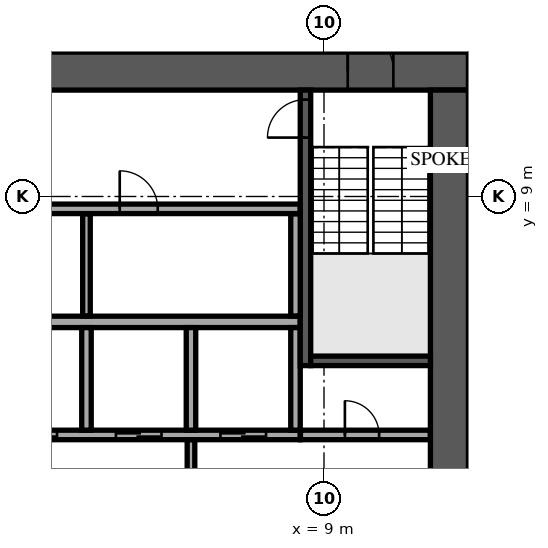
"""IFC4 building model, lengths in metres.
Left out: names, types, materials, properties, quantities, classifications, styles, units other than length and angle.
Written with IfcOpenShell. Run it as: python <this file> out.ifc"""

import sys

from ifc_helpers import new_model, si_unit, direction, frame, frame_2d, origin, place, context, subcontext, project, spatial, rectangle, extrude, element, fill, save


model = new_model("IFC4")
c1 = context("Model", 3, precision=1e-05, world=origin(), true_north=direction((0.0, 1.0)))
c2 = subcontext(c1, "Body", "Model", "MODEL_VIEW")
j1 = project(units=[si_unit("LENGTHUNIT", "METRE"), si_unit("PLANEANGLEUNIT", "RADIAN")], contexts=[c1])
p1 = place(None, origin())
s1 = spatial("IfcSite", under=j1, at=p1, CompositionType="ELEMENT")
p2 = place(p1, origin())
s2 = spatial("IfcBuilding", under=s1, at=p2, CompositionType="ELEMENT")
p3 = place(p2, frame((0.0, 0.0, 163.7)))
s3 = spatial("IfcBuildingStorey", under=s2, at=p3, CompositionType="ELEMENT", Elevation=163.7)
p4 = place(p3, frame((-12.8, 12.3, 0.0), z_axis=(0.0, 0.0, 1.0), x_axis=(1.0, 0.0, 0.0)))
e1 = element("IfcWall", 1, at=p4, inside=s3, PredefinedType="SHEAR", context=c2, shape_type="SweptSolid", body=[
    extrude(rectangle(XDim=25.6, YDim=1.0, at=frame_2d((12.8, 0.0))), origin(), (0.0, 0.0, 1.0), 3.6),
])
p5 = place(p4, frame((11.6, 0.0, 0.0)))
e2 = element("IfcOpeningElement", 2, at=p5, cuts=e1, PredefinedType="OPENING", context=c2, shape_type="SweptSolid", body=[
    extrude(rectangle(XDim=2.4, YDim=2.4, at=frame_2d((1.2, 1.2))), frame((0.0, 0.51, 0.0), z_axis=(0.0, -1.0, 0.0), x_axis=(1.0, 0.0, 0.0)), (0.0, 0.0, 1.0), 1.02),
])
p6 = place(p4, frame((22.425, 0.0, 0.0)))
e3 = element("IfcOpeningElement", 3, at=p6, cuts=e1, PredefinedType="OPENING", context=c2, shape_type="SweptSolid", body=[
    extrude(rectangle(XDim=1.2, YDim=2.1, at=frame_2d((0.6, 1.05))), frame((0.0, 0.51, 0.0), z_axis=(0.0, -1.0, 0.0), x_axis=(1.0, 0.0, 0.0)), (0.0, 0.0, 1.0), 1.02),
])
p7 = place(p4, frame((1.4, 0.0, 0.0)))
e4 = element("IfcOpeningElement", 4, at=p7, cuts=e1, PredefinedType="OPENING", context=c2, shape_type="SweptSolid", body=[
    extrude(rectangle(XDim=1.0, YDim=2.1, at=frame_2d((0.5, 1.05))), frame((0.0, 0.51, 0.0), z_axis=(0.0, -1.0, 0.0), x_axis=(1.0, 0.0, 0.0)), (0.0, 0.0, 1.0), 1.02),
])
p8 = place(p3, frame((12.3, -11.8, 0.0), z_axis=(0.0, 0.0, 1.0), x_axis=(0.0, 1.0, 0.0)))
e5 = element("IfcWall", 5, at=p8, inside=s3, PredefinedType="SHEAR", context=c2, shape_type="SweptSolid", body=[
    extrude(rectangle(XDim=23.6, YDim=1.0, at=frame_2d((11.8, 0.0))), origin(), (0.0, 0.0, 1.0), 3.6),
])
p9 = place(p8, frame((10.6, 0.0, 0.0)))
e6 = element("IfcOpeningElement", 6, at=p9, cuts=e5, PredefinedType="OPENING", context=c2, shape_type="SweptSolid", body=[
    extrude(rectangle(XDim=2.4, YDim=2.4, at=frame_2d((1.2, 1.2))), frame((0.0, 0.51, 0.0), z_axis=(0.0, -1.0, 0.0), x_axis=(1.0, 0.0, 0.0)), (0.0, 0.0, 1.0), 1.02),
])
p10 = place(p3, frame((-8.375, 5.7, 0.0), z_axis=(0.0, 0.0, 1.0), x_axis=(1.0, 0.0, 0.0)))
e7 = element("IfcWall", 7, at=p10, inside=s3, PredefinedType="SOLIDWALL", context=c2, shape_type="SweptSolid", body=[
    extrude(rectangle(XDim=16.75, YDim=0.3, at=frame_2d((8.375, 0.0))), origin(), (0.0, 0.0, 1.0), 3.6),
])
p11 = place(p3, frame((-8.375, 2.725, 0.0), z_axis=(0.0, 0.0, 1.0), x_axis=(1.0, 0.0, 0.0)))
e8 = element("IfcWall", 8, at=p11, inside=s3, PredefinedType="SOLIDWALL", context=c2, shape_type="SweptSolid", body=[
    extrude(rectangle(XDim=16.75, YDim=0.25, at=frame_2d((8.375, 0.0))), origin(), (0.0, 0.0, 1.0), 3.6),
])
p12 = place(p11, frame((0.9, 0.0, 0.0)))
e9 = element("IfcOpeningElement", 9, at=p12, cuts=e8, PredefinedType="OPENING", context=c2, shape_type="SweptSolid", body=[
    extrude(rectangle(XDim=1.2, YDim=2.1, at=frame_2d((0.6, 1.05))), frame((0.0, 0.135, 0.0), z_axis=(0.0, -1.0, 0.0), x_axis=(1.0, 0.0, 0.0)), (0.0, 0.0, 1.0), 0.27),
])
p13 = place(p11, frame((3.65, 0.0, 0.0)))
e10 = element("IfcOpeningElement", 10, at=p13, cuts=e8, PredefinedType="OPENING", context=c2, shape_type="SweptSolid", body=[
    extrude(rectangle(XDim=1.2, YDim=2.1, at=frame_2d((0.6, 1.05))), frame((0.0, 0.135, 0.0), z_axis=(0.0, -1.0, 0.0), x_axis=(1.0, 0.0, 0.0)), (0.0, 0.0, 1.0), 0.27),
])
p14 = place(p11, frame((6.4, 0.0, 0.0)))
e11 = element("IfcOpeningElement", 11, at=p14, cuts=e8, PredefinedType="OPENING", context=c2, shape_type="SweptSolid", body=[
    extrude(rectangle(XDim=1.2, YDim=2.1, at=frame_2d((0.6, 1.05))), frame((0.0, 0.135, 0.0), z_axis=(0.0, -1.0, 0.0), x_axis=(1.0, 0.0, 0.0)), (0.0, 0.0, 1.0), 0.27),
])
p15 = place(p11, frame((9.15, 0.0, 0.0)))
e12 = element("IfcOpeningElement", 12, at=p15, cuts=e8, PredefinedType="OPENING", context=c2, shape_type="SweptSolid", body=[
    extrude(rectangle(XDim=1.2, YDim=2.1, at=frame_2d((0.6, 1.05))), frame((0.0, 0.135, 0.0), z_axis=(0.0, -1.0, 0.0), x_axis=(1.0, 0.0, 0.0)), (0.0, 0.0, 1.0), 0.27),
])
p16 = place(p11, frame((11.9, 0.0, 0.0)))
e13 = element("IfcOpeningElement", 13, at=p16, cuts=e8, PredefinedType="OPENING", context=c2, shape_type="SweptSolid", body=[
    extrude(rectangle(XDim=1.2, YDim=2.1, at=frame_2d((0.6, 1.05))), frame((0.0, 0.135, 0.0), z_axis=(0.0, -1.0, 0.0), x_axis=(1.0, 0.0, 0.0)), (0.0, 0.0, 1.0), 0.27),
])
p17 = place(p11, frame((14.65, 0.0, 0.0)))
e14 = element("IfcOpeningElement", 14, at=p17, cuts=e8, PredefinedType="OPENING", context=c2, shape_type="SweptSolid", body=[
    extrude(rectangle(XDim=1.2, YDim=2.1, at=frame_2d((0.6, 1.05))), frame((0.0, 0.135, 0.0), z_axis=(0.0, -1.0, 0.0), x_axis=(1.0, 0.0, 0.0)), (0.0, 0.0, 1.0), 0.27),
])
for number, where, z_axis, x_axis in (
    (15, (2.75, 2.85, 0.0), (0.0, 0.0, 1.0), (0.0, 1.0, 0.0)),
    (16, (5.5, 2.85, 0.0), (0.0, 0.0, 1.0), (0.0, 1.0, 0.0)),
    (17, (8.25, 2.85, 0.0), (0.0, 0.0, 1.0), (0.0, 1.0, 0.0)),
):
    element("IfcWall", number, at=place(p3, frame(where, z_axis=z_axis, x_axis=x_axis)), inside=s3, PredefinedType="SOLIDWALL", context=c2, shape_type="SweptSolid", body=[
        extrude(rectangle(XDim=2.7, YDim=0.25, at=frame_2d((1.35, 0.0))), origin(), (0.0, 0.0, 1.0), 3.6),
    ])
p18 = place(p3, frame((8.512, 4.55, 0.0), z_axis=(0.0, 0.0, 1.0), x_axis=(0.0, 1.0, 0.0)))
e18 = element("IfcWall", 18, at=p18, inside=s3, PredefinedType="SOLIDWALL", context=c2, shape_type="SweptSolid", body=[
    extrude(rectangle(XDim=7.25, YDim=0.275, at=frame_2d((3.625, 0.0))), origin(), (0.0, 0.0, 1.0), 3.6),
])
p19 = place(p18, frame((6.0, 0.0, 0.0)))
e19 = element("IfcOpeningElement", 19, at=p19, cuts=e18, PredefinedType="OPENING", context=c2, shape_type="SweptSolid", body=[
    extrude(rectangle(XDim=1.0, YDim=2.1, at=frame_2d((0.5, 1.05))), frame((0.0, 0.147, 0.0), z_axis=(0.0, -1.0, 0.0), x_axis=(1.0, 0.0, 0.0)), (0.0, 0.0, 1.0), 0.295),
])
p20 = place(p3, frame((8.65, 4.675, 0.0), z_axis=(0.0, 0.0, 1.0), x_axis=(1.0, 0.0, 0.0)))
e20 = element("IfcWall", 20, at=p20, inside=s3, PredefinedType="SOLIDWALL", context=c2, shape_type="SweptSolid", body=[
    extrude(rectangle(XDim=3.15, YDim=0.25, at=frame_2d((1.575, 0.0))), origin(), (0.0, 0.0, 1.0), 3.6),
])
p21 = place(p3, frame((5.5, -2.595, 0.0), z_axis=(0.0, 0.0, 1.0), x_axis=(0.0, 1.0, 0.0)))
e21 = element("IfcWall", 21, at=p21, inside=s3, PredefinedType="PARTITIONING", context=c2, shape_type="SweptSolid", body=[
    extrude(rectangle(XDim=5.19, YDim=0.2, at=frame_2d((2.595, 0.0))), origin(), (0.0, 0.0, 1.0), 3.6),
])
p22 = place(p21, frame((1.395, 0.0, 0.0)))
e22 = element("IfcOpeningElement", 22, at=p22, cuts=e21, PredefinedType="OPENING", context=c2, shape_type="SweptSolid", body=[
    extrude(rectangle(XDim=2.4, YDim=2.4, at=frame_2d((1.2, 1.2))), frame((0.0, 0.11, 0.0), z_axis=(0.0, -1.0, 0.0), x_axis=(1.0, 0.0, 0.0)), (0.0, 0.0, 1.0), 0.22),
])
p23 = place(p3, frame((8.38, 2.725, 0.0), z_axis=(0.0, 0.0, 1.0), x_axis=(1.0, 0.0, 0.0)))
e23 = element("IfcWall", 23, at=p23, inside=s3, PredefinedType="PARTITIONING", context=c2, shape_type="SweptSolid", body=[
    extrude(rectangle(XDim=3.415, YDim=0.25, at=frame_2d((1.708, 0.0))), origin(), (0.0, 0.0, 1.0), 3.6),
])
p24 = place(p23, frame((1.17, 0.0, 0.0)))
e24 = element("IfcOpeningElement", 24, at=p24, cuts=e23, PredefinedType="OPENING", context=c2, shape_type="SweptSolid", body=[
    extrude(rectangle(XDim=0.9, YDim=2.1, at=frame_2d((0.45, 1.05))), frame((0.0, 0.135, 0.0), z_axis=(0.0, -1.0, 0.0), x_axis=(1.0, 0.0, 0.0)), (0.0, 0.0, 1.0), 0.27),
])
p25 = place(p3, frame((2.75, 5.855, 0.0), z_axis=(0.0, 0.0, 1.0), x_axis=(0.0, 1.0, 0.0)))
e25 = element("IfcWall", 25, at=p25, inside=s3, PredefinedType="PARTITIONING", context=c2, shape_type="SweptSolid", body=[
    extrude(rectangle(XDim=2.69, YDim=0.2, at=frame_2d((1.345, 0.0))), origin(), (0.0, 0.0, 1.0), 3.6),
])
p26 = place(p3, frame((8.25, 5.855, 0.0), z_axis=(0.0, 0.0, 1.0), x_axis=(0.0, 1.0, 0.0)))
e26 = element("IfcWall", 26, at=p26, inside=s3, PredefinedType="PARTITIONING", context=c2, shape_type="SweptSolid", body=[
    extrude(rectangle(XDim=2.69, YDim=0.25, at=frame_2d((1.345, 0.0))), origin(), (0.0, 0.0, 1.0), 3.6),
])
p27 = place(p3, frame((-8.35, 8.675, 0.0), z_axis=(0.0, 0.0, 1.0), x_axis=(1.0, 0.0, 0.0)))
e27 = element("IfcWall", 27, at=p27, inside=s3, PredefinedType="PARTITIONING", context=c2, shape_type="SweptSolid", body=[
    extrude(rectangle(XDim=16.72, YDim=0.25, at=frame_2d((8.36, 0.0))), origin(), (0.0, 0.0, 1.0), 3.6),
])
p28 = place(p27, frame((0.875, 0.0, 0.0)))
e28 = element("IfcOpeningElement", 28, at=p28, cuts=e27, PredefinedType="OPENING", context=c2, shape_type="SweptSolid", body=[
    extrude(rectangle(XDim=1.2, YDim=2.1, at=frame_2d((0.6, 1.05))), frame((0.0, 0.135, 0.0), z_axis=(0.0, -1.0, 0.0), x_axis=(1.0, 0.0, 0.0)), (0.0, 0.0, 1.0), 0.27),
])
p29 = place(p27, frame((11.975, 0.0, 0.0)))
e29 = element("IfcOpeningElement", 29, at=p29, cuts=e27, PredefinedType="OPENING", context=c2, shape_type="SweptSolid", body=[
    extrude(rectangle(XDim=1.0, YDim=2.1, at=frame_2d((0.5, 1.05))), frame((0.0, 0.135, 0.0), z_axis=(0.0, -1.0, 0.0), x_axis=(1.0, 0.0, 0.0)), (0.0, 0.0, 1.0), 0.27),
])
p30 = place(p3, frame((4.48, 35.516, 0.0), z_axis=(0.0, 0.0, 1.0), x_axis=(-0.809018017995, -0.587783843398, 0.0)))
e30 = element("IfcWall", 30, at=p30, inside=s3, PredefinedType="STANDARD", context=c2, shape_type="SweptSolid", body=[
    extrude(rectangle(XDim=49.376, YDim=0.6, at=frame_2d((24.688, 0.0))), origin(), (0.0, 0.0, 1.0), 3.6),
])
p31 = place(p30, frame((1.2, 0.0, 0.9)))
e31 = element("IfcOpeningElement", 31, at=p31, cuts=e30, PredefinedType="OPENING", context=c2, shape_type="SweptSolid", body=[
    extrude(rectangle(XDim=2.1, YDim=2.1, at=frame_2d((1.05, 1.05))), frame((0.0, 0.31, 0.0), z_axis=(0.0, -1.0, 0.0), x_axis=(1.0, 0.0, 0.0)), (0.0, 0.0, 1.0), 0.62),
])
p32 = place(p30, frame((5.7, 0.0, 0.9)))
e32 = element("IfcOpeningElement", 32, at=p32, cuts=e30, PredefinedType="OPENING", context=c2, shape_type="SweptSolid", body=[
    extrude(rectangle(XDim=2.1, YDim=2.1, at=frame_2d((1.05, 1.05))), frame((0.0, 0.31, 0.0), z_axis=(0.0, -1.0, 0.0), x_axis=(1.0, 0.0, 0.0)), (0.0, 0.0, 1.0), 0.62),
])
p33 = place(p30, frame((10.2, 0.0, 0.9)))
e33 = element("IfcOpeningElement", 33, at=p33, cuts=e30, PredefinedType="OPENING", context=c2, shape_type="SweptSolid", body=[
    extrude(rectangle(XDim=2.1, YDim=2.1, at=frame_2d((1.05, 1.05))), frame((0.0, 0.31, 0.0), z_axis=(0.0, -1.0, 0.0), x_axis=(1.0, 0.0, 0.0)), (0.0, 0.0, 1.0), 0.62),
])
p34 = place(p30, frame((14.7, 0.0, 0.9)))
e34 = element("IfcOpeningElement", 34, at=p34, cuts=e30, PredefinedType="OPENING", context=c2, shape_type="SweptSolid", body=[
    extrude(rectangle(XDim=2.1, YDim=2.1, at=frame_2d((1.05, 1.05))), frame((0.0, 0.31, 0.0), z_axis=(0.0, -1.0, 0.0), x_axis=(1.0, 0.0, 0.0)), (0.0, 0.0, 1.0), 0.62),
])
p35 = place(p30, frame((19.2, 0.0, 0.9)))
e35 = element("IfcOpeningElement", 35, at=p35, cuts=e30, PredefinedType="OPENING", context=c2, shape_type="SweptSolid", body=[
    extrude(rectangle(XDim=2.1, YDim=2.1, at=frame_2d((1.05, 1.05))), frame((0.0, 0.31, 0.0), z_axis=(0.0, -1.0, 0.0), x_axis=(1.0, 0.0, 0.0)), (0.0, 0.0, 1.0), 0.62),
])
p36 = place(p30, frame((23.7, 0.0, 0.9)))
e36 = element("IfcOpeningElement", 36, at=p36, cuts=e30, PredefinedType="OPENING", context=c2, shape_type="SweptSolid", body=[
    extrude(rectangle(XDim=2.1, YDim=2.1, at=frame_2d((1.05, 1.05))), frame((0.0, 0.31, 0.0), z_axis=(0.0, -1.0, 0.0), x_axis=(1.0, 0.0, 0.0)), (0.0, 0.0, 1.0), 0.62),
])
p37 = place(p30, frame((28.2, 0.0, 0.9)))
e37 = element("IfcOpeningElement", 37, at=p37, cuts=e30, PredefinedType="OPENING", context=c2, shape_type="SweptSolid", body=[
    extrude(rectangle(XDim=2.1, YDim=2.1, at=frame_2d((1.05, 1.05))), frame((0.0, 0.31, 0.0), z_axis=(0.0, -1.0, 0.0), x_axis=(1.0, 0.0, 0.0)), (0.0, 0.0, 1.0), 0.62),
])
p38 = place(p30, frame((32.7, 0.0, 0.9)))
e38 = element("IfcOpeningElement", 38, at=p38, cuts=e30, PredefinedType="OPENING", context=c2, shape_type="SweptSolid", body=[
    extrude(rectangle(XDim=2.1, YDim=2.1, at=frame_2d((1.05, 1.05))), frame((0.0, 0.31, 0.0), z_axis=(0.0, -1.0, 0.0), x_axis=(1.0, 0.0, 0.0)), (0.0, 0.0, 1.0), 0.62),
])
p39 = place(p30, frame((37.2, 0.0, 0.9)))
e39 = element("IfcOpeningElement", 39, at=p39, cuts=e30, PredefinedType="OPENING", context=c2, shape_type="SweptSolid", body=[
    extrude(rectangle(XDim=2.1, YDim=2.1, at=frame_2d((1.05, 1.05))), frame((0.0, 0.31, 0.0), z_axis=(0.0, -1.0, 0.0), x_axis=(1.0, 0.0, 0.0)), (0.0, 0.0, 1.0), 0.62),
])
p40 = place(p30, frame((41.7, 0.0, 0.9)))
e40 = element("IfcOpeningElement", 40, at=p40, cuts=e30, PredefinedType="OPENING", context=c2, shape_type="SweptSolid", body=[
    extrude(rectangle(XDim=2.1, YDim=2.1, at=frame_2d((1.05, 1.05))), frame((0.0, 0.31, 0.0), z_axis=(0.0, -1.0, 0.0), x_axis=(1.0, 0.0, 0.0)), (0.0, 0.0, 1.0), 0.62),
])
p41 = place(p30, frame((46.138, 0.0, 0.9)))
e41 = element("IfcOpeningElement", 41, at=p41, cuts=e30, PredefinedType="OPENING", context=c2, shape_type="SweptSolid", body=[
    extrude(rectangle(XDim=2.1, YDim=2.1, at=frame_2d((1.05, 1.05))), frame((0.0, 0.31, 0.0), z_axis=(0.0, -1.0, 0.0), x_axis=(1.0, 0.0, 0.0)), (0.0, 0.0, 1.0), 0.62),
])
p42 = place(p3, frame((36.533, 0.245, 0.0), z_axis=(0.0, 0.0, 1.0), x_axis=(-0.58778579343, 0.809016601215, 0.0)))
e42 = element("IfcWall", 42, at=p42, inside=s3, PredefinedType="STANDARD", context=c2, shape_type="SweptSolid", body=[
    extrude(rectangle(XDim=42.176, YDim=0.6, at=frame_2d((21.088, 0.0))), origin(), (0.0, 0.0, 1.0), 3.6),
])
p43 = place(p42, frame((1.138, 0.0, 0.9)))
e43 = element("IfcOpeningElement", 43, at=p43, cuts=e42, PredefinedType="OPENING", context=c2, shape_type="SweptSolid", body=[
    extrude(rectangle(XDim=2.3, YDim=2.1, at=frame_2d((1.15, 1.05))), frame((0.0, 0.31, 0.0), z_axis=(0.0, -1.0, 0.0), x_axis=(1.0, 0.0, 0.0)), (0.0, 0.0, 1.0), 0.62),
])
p44 = place(p42, frame((5.776, 0.0, 0.9)))
e44 = element("IfcOpeningElement", 44, at=p44, cuts=e42, PredefinedType="OPENING", context=c2, shape_type="SweptSolid", body=[
    extrude(rectangle(XDim=2.3, YDim=2.1, at=frame_2d((1.15, 1.05))), frame((0.0, 0.31, 0.0), z_axis=(0.0, -1.0, 0.0), x_axis=(1.0, 0.0, 0.0)), (0.0, 0.0, 1.0), 0.62),
])
p45 = place(p42, frame((10.476, 0.0, 0.9)))
e45 = element("IfcOpeningElement", 45, at=p45, cuts=e42, PredefinedType="OPENING", context=c2, shape_type="SweptSolid", body=[
    extrude(rectangle(XDim=2.3, YDim=2.1, at=frame_2d((1.15, 1.05))), frame((0.0, 0.31, 0.0), z_axis=(0.0, -1.0, 0.0), x_axis=(1.0, 0.0, 0.0)), (0.0, 0.0, 1.0), 0.62),
])
p46 = place(p42, frame((15.176, 0.0, 0.9)))
e46 = element("IfcOpeningElement", 46, at=p46, cuts=e42, PredefinedType="OPENING", context=c2, shape_type="SweptSolid", body=[
    extrude(rectangle(XDim=2.3, YDim=2.1, at=frame_2d((1.15, 1.05))), frame((0.0, 0.31, 0.0), z_axis=(0.0, -1.0, 0.0), x_axis=(1.0, 0.0, 0.0)), (0.0, 0.0, 1.0), 0.62),
])
p47 = place(p42, frame((19.876, 0.0, 0.9)))
e47 = element("IfcOpeningElement", 47, at=p47, cuts=e42, PredefinedType="OPENING", context=c2, shape_type="SweptSolid", body=[
    extrude(rectangle(XDim=2.3, YDim=2.1, at=frame_2d((1.15, 1.05))), frame((0.0, 0.31, 0.0), z_axis=(0.0, -1.0, 0.0), x_axis=(1.0, 0.0, 0.0)), (0.0, 0.0, 1.0), 0.62),
])
p48 = place(p42, frame((24.576, 0.0, 0.9)))
e48 = element("IfcOpeningElement", 48, at=p48, cuts=e42, PredefinedType="OPENING", context=c2, shape_type="SweptSolid", body=[
    extrude(rectangle(XDim=2.3, YDim=2.1, at=frame_2d((1.15, 1.05))), frame((0.0, 0.31, 0.0), z_axis=(0.0, -1.0, 0.0), x_axis=(1.0, 0.0, 0.0)), (0.0, 0.0, 1.0), 0.62),
])
p49 = place(p42, frame((29.276, 0.0, 0.9)))
e49 = element("IfcOpeningElement", 49, at=p49, cuts=e42, PredefinedType="OPENING", context=c2, shape_type="SweptSolid", body=[
    extrude(rectangle(XDim=2.3, YDim=2.1, at=frame_2d((1.15, 1.05))), frame((0.0, 0.31, 0.0), z_axis=(0.0, -1.0, 0.0), x_axis=(1.0, 0.0, 0.0)), (0.0, 0.0, 1.0), 0.62),
])
p50 = place(p42, frame((33.976, 0.0, 0.9)))
e50 = element("IfcOpeningElement", 50, at=p50, cuts=e42, PredefinedType="OPENING", context=c2, shape_type="SweptSolid", body=[
    extrude(rectangle(XDim=2.3, YDim=2.1, at=frame_2d((1.15, 1.05))), frame((0.0, 0.31, 0.0), z_axis=(0.0, -1.0, 0.0), x_axis=(1.0, 0.0, 0.0)), (0.0, 0.0, 1.0), 0.62),
])
p51 = place(p42, frame((38.676, 0.0, 0.9)))
e51 = element("IfcOpeningElement", 51, at=p51, cuts=e42, PredefinedType="OPENING", context=c2, shape_type="SweptSolid", body=[
    extrude(rectangle(XDim=2.3, YDim=2.1, at=frame_2d((1.15, 1.05))), frame((0.0, 0.31, 0.0), z_axis=(0.0, -1.0, 0.0), x_axis=(1.0, 0.0, 0.0)), (0.0, 0.0, 1.0), 0.62),
])
p52 = place(p3, frame((-26.166, 4.749, 0.0), z_axis=(0.0, 0.0, 1.0), x_axis=(0.809023795939, 0.587775890628, 0.0)))
e52 = element("IfcWall", 52, at=p52, inside=s3, PredefinedType="PARTITIONING", context=c2, shape_type="SweptSolid", body=[
    extrude(rectangle(XDim=36.756, YDim=0.15, at=frame_2d((18.378, 0.0))), origin(), (0.0, 0.0, 1.0), 3.15),
])
p53 = place(p52, frame((1.8, 0.0, 0.0)))
e53 = element("IfcOpeningElement", 53, at=p53, cuts=e52, PredefinedType="OPENING", context=c2, shape_type="SweptSolid", body=[
    extrude(rectangle(XDim=1.0, YDim=2.1, at=frame_2d((0.5, 1.05))), frame((0.0, 0.085, 0.0), z_axis=(0.0, -1.0, 0.0), x_axis=(1.0, 0.0, 0.0)), (0.0, 0.0, 1.0), 0.17),
])
p54 = place(p52, frame((7.453, 0.0, 0.0)))
e54 = element("IfcOpeningElement", 54, at=p54, cuts=e52, PredefinedType="OPENING", context=c2, shape_type="SweptSolid", body=[
    extrude(rectangle(XDim=1.0, YDim=2.1, at=frame_2d((0.5, 1.05))), frame((0.0, 0.085, 0.0), z_axis=(0.0, -1.0, 0.0), x_axis=(1.0, 0.0, 0.0)), (0.0, 0.0, 1.0), 0.17),
])
p55 = place(p52, frame((20.671, 0.0, 0.0)))
e55 = element("IfcOpeningElement", 55, at=p55, cuts=e52, PredefinedType="OPENING", context=c2, shape_type="SweptSolid", body=[
    extrude(rectangle(XDim=1.0, YDim=2.1, at=frame_2d((0.5, 1.05))), frame((0.0, 0.085, 0.0), z_axis=(0.0, -1.0, 0.0), x_axis=(1.0, 0.0, 0.0)), (0.0, 0.0, 1.0), 0.17),
])
p56 = place(p52, frame((27.382, 0.0, 0.0)))
e56 = element("IfcOpeningElement", 56, at=p56, cuts=e52, PredefinedType="OPENING", context=c2, shape_type="SweptSolid", body=[
    extrude(rectangle(XDim=1.8, YDim=2.1, at=frame_2d((0.9, 1.05))), frame((0.0, 0.085, 0.0), z_axis=(0.0, -1.0, 0.0), x_axis=(1.0, 0.0, 0.0)), (0.0, 0.0, 1.0), 0.17),
])
p57 = place(p3, frame((9.681, 24.652, 0.0), z_axis=(0.0, 0.0, 1.0), x_axis=(0.58776328895, -0.809032951222, 0.0)))
e57 = element("IfcWall", 57, at=p57, inside=s3, PredefinedType="PARTITIONING", context=c2, shape_type="SweptSolid", body=[
    extrude(rectangle(XDim=28.583, YDim=0.15, at=frame_2d((14.291, 0.0))), origin(), (0.0, 0.0, 1.0), 3.15),
])
p58 = place(p57, frame((12.256, 0.0, 0.0)))
e58 = element("IfcOpeningElement", 58, at=p58, cuts=e57, PredefinedType="OPENING", context=c2, shape_type="SweptSolid", body=[
    extrude(rectangle(XDim=1.0, YDim=2.1, at=frame_2d((0.5, 1.05))), frame((0.0, 0.085, 0.0), z_axis=(0.0, -1.0, 0.0), x_axis=(1.0, 0.0, 0.0)), (0.0, 0.0, 1.0), 0.17),
])
p59 = place(p6, origin())
e59 = element("IfcDoor", 59, at=p59, inside=s3, OperationType="SINGLE_SWING_LEFT", PredefinedType="DOOR", context=c2, shape_type="SweptSolid", body=[
    extrude(rectangle(XDim=1.2, YDim=2.1, at=frame_2d((0.6, 1.05))), frame((0.0, 0.025, 0.0), z_axis=(0.0, -1.0, 0.0), x_axis=(1.0, 0.0, 0.0)), (0.0, 0.0, 1.0), 0.05),
])
fill(e3, e59)
p60 = place(p15, origin())
e60 = element("IfcDoor", 60, at=p60, inside=s3, OperationType="DOUBLE_DOOR_SLIDING", PredefinedType="DOOR", context=c2, shape_type="SweptSolid", body=[
    extrude(rectangle(XDim=1.2, YDim=2.1, at=frame_2d((0.6, 1.05))), frame((0.0, 0.025, 0.0), z_axis=(0.0, -1.0, 0.0), x_axis=(1.0, 0.0, 0.0)), (0.0, 0.0, 1.0), 0.05),
])
fill(e12, e60)
p61 = place(p16, origin())
e61 = element("IfcDoor", 61, at=p61, inside=s3, OperationType="DOUBLE_DOOR_SLIDING", PredefinedType="DOOR", context=c2, shape_type="SweptSolid", body=[
    extrude(rectangle(XDim=1.2, YDim=2.1, at=frame_2d((0.6, 1.05))), frame((0.0, 0.025, 0.0), z_axis=(0.0, -1.0, 0.0), x_axis=(1.0, 0.0, 0.0)), (0.0, 0.0, 1.0), 0.05),
])
fill(e13, e61)
p62 = place(p17, origin())
e62 = element("IfcDoor", 62, at=p62, inside=s3, OperationType="DOUBLE_DOOR_SLIDING", PredefinedType="DOOR", context=c2, shape_type="SweptSolid", body=[
    extrude(rectangle(XDim=1.2, YDim=2.1, at=frame_2d((0.6, 1.05))), frame((0.0, 0.025, 0.0), z_axis=(0.0, -1.0, 0.0), x_axis=(1.0, 0.0, 0.0)), (0.0, 0.0, 1.0), 0.05),
])
fill(e14, e62)
p63 = place(p19, origin())
e63 = element("IfcDoor", 63, at=p63, inside=s3, OperationType="SINGLE_SWING_LEFT", PredefinedType="DOOR", context=c2, shape_type="SweptSolid", body=[
    extrude(rectangle(XDim=1.0, YDim=2.1, at=frame_2d((0.5, 1.05))), frame((0.0, 0.025, 0.0), z_axis=(0.0, -1.0, 0.0), x_axis=(1.0, 0.0, 0.0)), (0.0, 0.0, 1.0), 0.05),
])
fill(e19, e63)
p64 = place(p24, origin())
e64 = element("IfcDoor", 64, at=p64, inside=s3, OperationType="SINGLE_SWING_LEFT", PredefinedType="DOOR", context=c2, shape_type="SweptSolid", body=[
    extrude(rectangle(XDim=0.9, YDim=2.1, at=frame_2d((0.45, 1.05))), frame((0.0, 0.025, 0.0), z_axis=(0.0, -1.0, 0.0), x_axis=(1.0, 0.0, 0.0)), (0.0, 0.0, 1.0), 0.05),
])
fill(e24, e64)
p65 = place(p29, origin())
e65 = element("IfcDoor", 65, at=p65, inside=s3, OperationType="SINGLE_SWING_LEFT", PredefinedType="DOOR", context=c2, shape_type="SweptSolid", body=[
    extrude(rectangle(XDim=1.0, YDim=2.1, at=frame_2d((0.5, 1.05))), frame((0.0, 0.025, 0.0), z_axis=(0.0, -1.0, 0.0), x_axis=(1.0, 0.0, 0.0)), (0.0, 0.0, 1.0), 0.05),
])
fill(e29, e65)
save(model, sys.argv[1])
